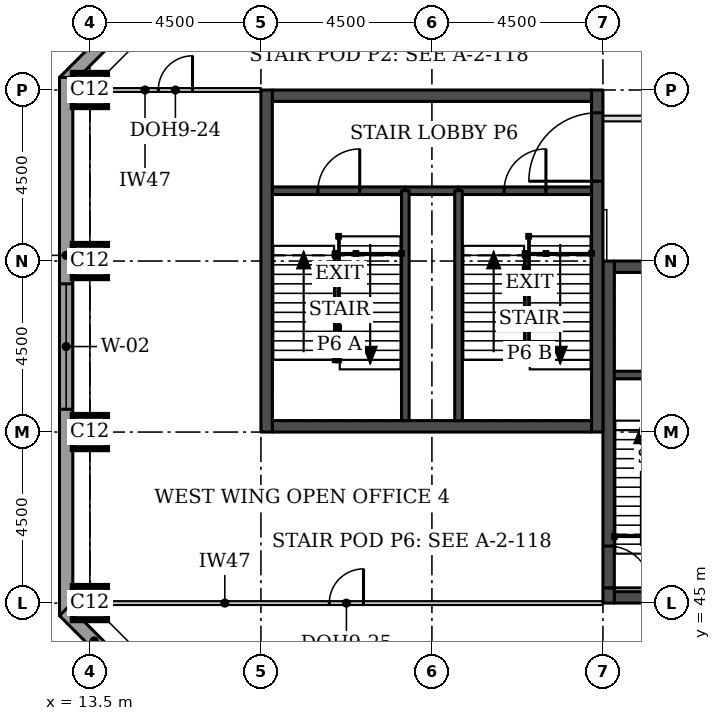
"""IFC4 building model, lengths in metres.
Left out: names, types, materials, properties, quantities, classifications, styles, units other than length and angle.
Written with IfcOpenShell. Run it as: python <this file> out.ifc"""

import sys

from ifc_helpers import new_model, si_unit, direction, frame, frame_2d, origin, origin_2d, place, context, subcontext, project, spatial, rectangle, extrude, element, fill, save


model = new_model("IFC4")
c1 = context("Model", 3, precision=1e-05, world=origin(), true_north=direction((0.0, 1.0)))
c2 = subcontext(c1, "Body", "Model", "MODEL_VIEW")
j1 = project(units=[si_unit("LENGTHUNIT", "METRE"), si_unit("PLANEANGLEUNIT", "RADIAN")], contexts=[c1])
p1 = place(None, origin())
s1 = spatial("IfcSite", under=j1, at=p1, CompositionType="ELEMENT")
p2 = place(p1, origin())
s2 = spatial("IfcBuilding", under=s1, at=p2, CompositionType="ELEMENT")
p3 = place(p2, frame((0.0, 0.0, 219.3)))
s3 = spatial("IfcBuildingStorey", under=s2, at=p3, CompositionType="ELEMENT", Elevation=219.3)
for number, where, z_axis, x_axis in (
    (1, (13.5, 45.0, 0.0), (0.0, 0.0, 1.0), (1.0, 0.0, 0.0)),
    (2, (13.5, 49.5, 0.0), (0.0, 0.0, 1.0), (1.0, 0.0, 0.0)),
    (3, (13.5, 54.0, 0.0), (0.0, 0.0, 1.0), (1.0, 0.0, 0.0)),
    (4, (13.5, 58.5, 0.0), (0.0, 0.0, 1.0), (1.0, 0.0, 0.0)),
):
    element("IfcColumn", number, at=place(p3, frame(where, z_axis=z_axis, x_axis=x_axis)), inside=s3, PredefinedType="COLUMN", context=c2, shape_type="SweptSolid", body=[
        extrude(rectangle(XDim=0.9, YDim=0.9, at=origin_2d()), origin(), (0.0, 0.0, 1.0), 3.7),
    ])
p4 = place(p3, frame((27.3, 45.15, 0.0), z_axis=(0.0, 0.0, 1.0), x_axis=(1.0, 0.0, 0.0)))
e5 = element("IfcWall", 5, at=p4, inside=s3, PredefinedType="SHEAR", context=c2, shape_type="SweptSolid", body=[
    extrude(rectangle(XDim=8.4, YDim=0.3, at=frame_2d((4.2, 0.0))), origin(), (0.0, 0.0, 1.0), 3.7),
])
p5 = place(p4, frame((5.2, 0.0, 0.0)))
e6 = element("IfcOpeningElement", 6, at=p5, cuts=e5, PredefinedType="OPENING", context=c2, shape_type="SweptSolid", body=[
    extrude(rectangle(XDim=1.0, YDim=2.1, at=frame_2d((0.5, 1.05))), frame((0.0, 0.16, 0.0), z_axis=(0.0, -1.0, 0.0), x_axis=(1.0, 0.0, 0.0)), (0.0, 0.0, 1.0), 0.32),
])
p6 = place(p3, frame((27.3, 53.85, 0.0), z_axis=(0.0, 0.0, 1.0), x_axis=(1.0, 0.0, 0.0)))
e7 = element("IfcWall", 7, at=p6, inside=s3, PredefinedType="SHEAR", context=c2, shape_type="SweptSolid", body=[
    extrude(rectangle(XDim=8.4, YDim=0.3, at=frame_2d((4.2, 0.0))), origin(), (0.0, 0.0, 1.0), 3.7),
])
p7 = place(p6, frame((6.4, 0.0, 0.0)))
e8 = element("IfcOpeningElement", 8, at=p7, cuts=e7, PredefinedType="OPENING", context=c2, shape_type="SweptSolid", body=[
    extrude(rectangle(XDim=1.1, YDim=2.1, at=frame_2d((0.55, 1.05))), frame((0.0, 0.16, 0.0), z_axis=(0.0, -1.0, 0.0), x_axis=(1.0, 0.0, 0.0)), (0.0, 0.0, 1.0), 0.32),
])
p8 = place(p3, frame((27.15, 45.0, 0.0), z_axis=(0.0, 0.0, 1.0), x_axis=(0.0, 1.0, 0.0)))
e9 = element("IfcWall", 9, at=p8, inside=s3, PredefinedType="SHEAR", context=c2, shape_type="SweptSolid", body=[
    extrude(rectangle(XDim=9.0, YDim=0.3, at=frame_2d((4.5, 0.0))), origin(), (0.0, 0.0, 1.0), 3.7),
])
p9 = place(p8, frame((0.4, 0.0, 0.0)))
e10 = element("IfcOpeningElement", 10, at=p9, cuts=e9, PredefinedType="OPENING", context=c2, shape_type="SweptSolid", body=[
    extrude(rectangle(XDim=1.1, YDim=2.1, at=frame_2d((0.55, 1.05))), frame((0.0, 0.16, 0.0), z_axis=(0.0, -1.0, 0.0), x_axis=(1.0, 0.0, 0.0)), (0.0, 0.0, 1.0), 0.32),
])
for number, where, z_axis, x_axis in (
    (11, (18.3, 49.65, 0.0), (0.0, 0.0, 1.0), (1.0, 0.0, 0.0)),
    (12, (18.3, 58.35, 0.0), (0.0, 0.0, 1.0), (1.0, 0.0, 0.0)),
):
    element("IfcWall", number, at=place(p3, frame(where, z_axis=z_axis, x_axis=x_axis)), inside=s3, PredefinedType="SHEAR", context=c2, shape_type="SweptSolid", body=[
        extrude(rectangle(XDim=8.4, YDim=0.3, at=frame_2d((4.2, 0.0))), origin(), (0.0, 0.0, 1.0), 3.7),
    ])
p10 = place(p3, frame((18.15, 49.5, 0.0), z_axis=(0.0, 0.0, 1.0), x_axis=(0.0, 1.0, 0.0)))
e13 = element("IfcWall", 13, at=p10, inside=s3, PredefinedType="SHEAR", context=c2, shape_type="SweptSolid", body=[
    extrude(rectangle(XDim=9.0, YDim=0.3, at=frame_2d((4.5, 0.0))), origin(), (0.0, 0.0, 1.0), 3.7),
])
p11 = place(p3, frame((26.85, 49.5, 0.0), z_axis=(0.0, 0.0, 1.0), x_axis=(0.0, 1.0, 0.0)))
e14 = element("IfcWall", 14, at=p11, inside=s3, PredefinedType="SHEAR", context=c2, shape_type="SweptSolid", body=[
    extrude(rectangle(XDim=9.0, YDim=0.3, at=frame_2d((4.5, 0.0))), origin(), (0.0, 0.0, 1.0), 3.7),
])
p12 = place(p11, frame((6.6, 0.0, 0.0)))
e15 = element("IfcOpeningElement", 15, at=p12, cuts=e14, PredefinedType="OPENING", context=c2, shape_type="SweptSolid", body=[
    extrude(rectangle(XDim=1.8, YDim=2.1, at=frame_2d((0.9, 1.05))), frame((0.0, 0.16, 0.0), z_axis=(0.0, -1.0, 0.0), x_axis=(1.0, 0.0, 0.0)), (0.0, 0.0, 1.0), 0.32),
])
p13 = place(p3, frame((17.792, 63.676, 0.0), z_axis=(0.0, 0.0, 1.0), x_axis=(-0.707106781187, -0.707106781187, 0.0)))
e16 = element("IfcWall", 16, at=p13, inside=s3, PredefinedType="STANDARD", context=c2, shape_type="SweptSolid", body=[
    extrude(rectangle(XDim=7.027, YDim=0.35, at=frame_2d((3.513, 0.0))), origin(), (0.0, 0.0, 1.0), 3.525),
])
p14 = place(p13, frame((1.863, 0.0, 0.9)))
e17 = element("IfcOpeningElement", 17, at=p14, cuts=e16, PredefinedType="OPENING", context=c2, shape_type="SweptSolid", body=[
    extrude(rectangle(XDim=3.3, YDim=1.9, at=frame_2d((1.65, 0.95))), frame((0.0, 0.185, 0.0), z_axis=(0.0, -1.0, 0.0), x_axis=(1.0, 0.0, 0.0)), (0.0, 0.0, 1.0), 0.37),
])
p15 = place(p3, frame((12.875, 58.831, 0.0), z_axis=(0.0, 0.0, 1.0), x_axis=(0.0, -1.0, 0.0)))
e18 = element("IfcWall", 18, at=p15, inside=s3, PredefinedType="STANDARD", context=c2, shape_type="SweptSolid", body=[
    extrude(rectangle(XDim=14.163, YDim=0.35, at=frame_2d((7.081, 0.0))), origin(), (0.0, 0.0, 1.0), 3.525),
])
p16 = place(p15, frame((5.431, 0.0, 0.9)))
e19 = element("IfcOpeningElement", 19, at=p16, cuts=e18, PredefinedType="OPENING", context=c2, shape_type="SweptSolid", body=[
    extrude(rectangle(XDim=3.3, YDim=1.9, at=frame_2d((1.65, 0.95))), frame((0.0, 0.185, 0.0), z_axis=(0.0, -1.0, 0.0), x_axis=(1.0, 0.0, 0.0)), (0.0, 0.0, 1.0), 0.37),
])
p17 = place(p3, frame((12.824, 44.792, 0.0), z_axis=(0.0, 0.0, 1.0), x_axis=(0.707106781187, -0.707106781187, 0.0)))
e20 = element("IfcWall", 20, at=p17, inside=s3, PredefinedType="STANDARD", context=c2, shape_type="SweptSolid", body=[
    extrude(rectangle(XDim=7.027, YDim=0.35, at=frame_2d((3.513, 0.0))), origin(), (0.0, 0.0, 1.0), 3.525),
])
p18 = place(p17, frame((1.863, 0.0, 0.9)))
e21 = element("IfcOpeningElement", 21, at=p18, cuts=e20, PredefinedType="OPENING", context=c2, shape_type="SweptSolid", body=[
    extrude(rectangle(XDim=3.3, YDim=1.9, at=frame_2d((1.65, 0.95))), frame((0.0, 0.185, 0.0), z_axis=(0.0, -1.0, 0.0), x_axis=(1.0, 0.0, 0.0)), (0.0, 0.0, 1.0), 0.37),
])
p19 = place(p3, frame((13.5, 58.5, 0.0), z_axis=(0.0, 0.0, 1.0), x_axis=(1.0, 0.0, 0.0)))
e22 = element("IfcWall", 22, at=p19, inside=s3, PredefinedType="PARTITIONING", context=c2, shape_type="SweptSolid", body=[
    extrude(rectangle(XDim=4.5, YDim=0.1, at=frame_2d((2.25, 0.0))), origin(), (0.0, 0.0, 1.0), 2.55),
])
p20 = place(p19, frame((1.8, 0.0, 0.0)))
e23 = element("IfcOpeningElement", 23, at=p20, cuts=e22, PredefinedType="OPENING", context=c2, shape_type="SweptSolid", body=[
    extrude(rectangle(XDim=0.9, YDim=2.1, at=frame_2d((0.45, 1.05))), frame((0.0, 0.06, 0.0), z_axis=(0.0, -1.0, 0.0), x_axis=(1.0, 0.0, 0.0)), (0.0, 0.0, 1.0), 0.12),
])
p21 = place(p3, frame((13.5, 45.0, 0.0), z_axis=(0.0, 0.0, 1.0), x_axis=(1.0, 0.0, 0.0)))
e24 = element("IfcWall", 24, at=p21, inside=s3, PredefinedType="PARTITIONING", context=c2, shape_type="SweptSolid", body=[
    extrude(rectangle(XDim=13.5, YDim=0.1, at=frame_2d((6.75, 0.0))), origin(), (0.0, 0.0, 1.0), 2.55),
])
p22 = place(p21, frame((6.3, 0.0, 0.0)))
e25 = element("IfcOpeningElement", 25, at=p22, cuts=e24, PredefinedType="OPENING", context=c2, shape_type="SweptSolid", body=[
    extrude(rectangle(XDim=0.9, YDim=2.1, at=frame_2d((0.45, 1.05))), frame((0.0, 0.06, 0.0), z_axis=(0.0, -1.0, 0.0), x_axis=(1.0, 0.0, 0.0)), (0.0, 0.0, 1.0), 0.12),
])
p23 = place(p3, frame((27.0, 57.75, 0.0), z_axis=(0.0, 0.0, 1.0), x_axis=(1.0, 0.0, 0.0)))
e26 = element("IfcWall", 26, at=p23, inside=s3, PredefinedType="PARTITIONING", context=c2, shape_type="SweptSolid", body=[
    extrude(rectangle(XDim=2.4, YDim=0.15, at=frame_2d((1.2, 0.0))), origin(), (0.0, 0.0, 1.0), 3.55),
])
p24 = place(p3, frame((27.3, 51.0, 0.0), z_axis=(0.0, 0.0, 1.0), x_axis=(1.0, 0.0, 0.0)))
e27 = element("IfcWall", 27, at=p24, inside=s3, PredefinedType="SOLIDWALL", context=c2, shape_type="SweptSolid", body=[
    extrude(rectangle(XDim=3.0, YDim=0.2, at=frame_2d((1.5, 0.0))), origin(), (0.0, 0.0, 1.0), 3.55),
])
p25 = place(p3, frame((21.8, 55.85, 0.0), z_axis=(0.0, 0.0, 1.0), x_axis=(1.0, 0.0, 0.0)))
e28 = element("IfcWall", 28, at=p25, inside=s3, PredefinedType="SOLIDWALL", context=c2, shape_type="SweptSolid", body=[
    extrude(rectangle(XDim=1.4, YDim=0.2, at=frame_2d((0.7, 0.0))), origin(), (0.0, 0.0, 1.0), 3.55),
])
p26 = place(p3, frame((18.3, 55.85, 0.0), z_axis=(0.0, 0.0, 1.0), x_axis=(1.0, 0.0, 0.0)))
e29 = element("IfcWall", 29, at=p26, inside=s3, PredefinedType="SOLIDWALL", context=c2, shape_type="SweptSolid", body=[
    extrude(rectangle(XDim=3.5, YDim=0.2, at=frame_2d((1.75, 0.0))), origin(), (0.0, 0.0, 1.0), 3.55),
])
p27 = place(p26, frame((1.2, 0.0, 0.0)))
e30 = element("IfcOpeningElement", 30, at=p27, cuts=e29, PredefinedType="OPENING", context=c2, shape_type="SweptSolid", body=[
    extrude(rectangle(XDim=1.1, YDim=2.1, at=frame_2d((0.55, 1.05))), frame((0.0, 0.11, 0.0), z_axis=(0.0, -1.0, 0.0), x_axis=(1.0, 0.0, 0.0)), (0.0, 0.0, 1.0), 0.22),
])
p28 = place(p3, frame((23.2, 55.85, 0.0), z_axis=(0.0, 0.0, 1.0), x_axis=(1.0, 0.0, 0.0)))
e31 = element("IfcWall", 31, at=p28, inside=s3, PredefinedType="SOLIDWALL", context=c2, shape_type="SweptSolid", body=[
    extrude(rectangle(XDim=3.5, YDim=0.2, at=frame_2d((1.75, 0.0))), origin(), (0.0, 0.0, 1.0), 3.55),
])
p29 = place(p28, frame((1.2, 0.0, 0.0)))
e32 = element("IfcOpeningElement", 32, at=p29, cuts=e31, PredefinedType="OPENING", context=c2, shape_type="SweptSolid", body=[
    extrude(rectangle(XDim=1.1, YDim=2.1, at=frame_2d((0.55, 1.05))), frame((0.0, 0.11, 0.0), z_axis=(0.0, -1.0, 0.0), x_axis=(1.0, 0.0, 0.0)), (0.0, 0.0, 1.0), 0.22),
])
for number, where, z_axis, x_axis in (
    (33, (21.8, 49.8, 0.0), (0.0, 0.0, 1.0), (0.0, 1.0, 0.0)),
    (34, (23.2, 49.8, 0.0), (0.0, 0.0, 1.0), (0.0, 1.0, 0.0)),
):
    element("IfcWall", number, at=place(p3, frame(where, z_axis=z_axis, x_axis=x_axis)), inside=s3, PredefinedType="SOLIDWALL", context=c2, shape_type="SweptSolid", body=[
        extrude(rectangle(XDim=6.05, YDim=0.2, at=frame_2d((3.025, 0.0))), origin(), (0.0, 0.0, 1.0), 3.55),
    ])
p30 = place(p16, origin())
e35 = element("IfcWindow", 35, at=p30, inside=s3, PartitioningType="SINGLE_PANEL", PredefinedType="WINDOW", context=c2, shape_type="SweptSolid", body=[
    extrude(rectangle(XDim=3.3, YDim=1.9, at=frame_2d((1.65, 0.95))), frame((0.0, 0.085, 0.0), z_axis=(0.0, -1.0, 0.0), x_axis=(1.0, 0.0, 0.0)), (0.0, 0.0, 1.0), 0.06),
])
fill(e19, e35)
p31 = place(p20, origin())
e36 = element("IfcDoor", 36, at=p31, inside=s3, OperationType="SINGLE_SWING_RIGHT", PredefinedType="DOOR", context=c2, shape_type="SweptSolid", body=[
    extrude(rectangle(XDim=0.9, YDim=2.1, at=frame_2d((0.45, 1.05))), frame((0.0, 0.025, 0.0), z_axis=(0.0, -1.0, 0.0), x_axis=(1.0, 0.0, 0.0)), (0.0, 0.0, 1.0), 0.05),
])
fill(e23, e36)
p32 = place(p22, origin())
e37 = element("IfcDoor", 37, at=p32, inside=s3, OperationType="SINGLE_SWING_RIGHT", PredefinedType="DOOR", context=c2, shape_type="SweptSolid", body=[
    extrude(rectangle(XDim=0.9, YDim=2.1, at=frame_2d((0.45, 1.05))), frame((0.0, 0.025, 0.0), z_axis=(0.0, -1.0, 0.0), x_axis=(1.0, 0.0, 0.0)), (0.0, 0.0, 1.0), 0.05),
])
fill(e25, e37)
p33 = place(p9, frame((1.1, 0.0, 0.0), z_axis=(0.0, 0.0, 1.0), x_axis=(-1.0, 0.0, 0.0)))
e38 = element("IfcDoor", 38, at=p33, inside=s3, OperationType="SINGLE_SWING_RIGHT", PredefinedType="DOOR", context=c2, shape_type="SweptSolid", body=[
    extrude(rectangle(XDim=1.1, YDim=2.1, at=frame_2d((0.55, 1.05))), frame((0.0, 0.025, 0.0), z_axis=(0.0, -1.0, 0.0), x_axis=(1.0, 0.0, 0.0)), (0.0, 0.0, 1.0), 0.05),
])
fill(e10, e38)
p34 = place(p27, origin())
e39 = element("IfcDoor", 39, at=p34, inside=s3, OperationType="SINGLE_SWING_RIGHT", PredefinedType="DOOR", context=c2, shape_type="SweptSolid", body=[
    extrude(rectangle(XDim=1.1, YDim=2.1, at=frame_2d((0.55, 1.05))), frame((0.0, 0.025, 0.0), z_axis=(0.0, -1.0, 0.0), x_axis=(1.0, 0.0, 0.0)), (0.0, 0.0, 1.0), 0.05),
])
fill(e30, e39)
p35 = place(p29, origin())
e40 = element("IfcDoor", 40, at=p35, inside=s3, OperationType="SINGLE_SWING_RIGHT", PredefinedType="DOOR", context=c2, shape_type="SweptSolid", body=[
    extrude(rectangle(XDim=1.1, YDim=2.1, at=frame_2d((0.55, 1.05))), frame((0.0, 0.025, 0.0), z_axis=(0.0, -1.0, 0.0), x_axis=(1.0, 0.0, 0.0)), (0.0, 0.0, 1.0), 0.05),
])
fill(e32, e40)
p36 = place(p12, origin())
e41 = element("IfcDoor", 41, at=p36, inside=s3, OperationType="SINGLE_SWING_LEFT", PredefinedType="DOOR", context=c2, shape_type="SweptSolid", body=[
    extrude(rectangle(XDim=1.8, YDim=2.1, at=frame_2d((0.9, 1.05))), frame((0.0, 0.025, 0.0), z_axis=(0.0, -1.0, 0.0), x_axis=(1.0, 0.0, 0.0)), (0.0, 0.0, 1.0), 0.05),
])
fill(e15, e41)
save(model, sys.argv[1])
